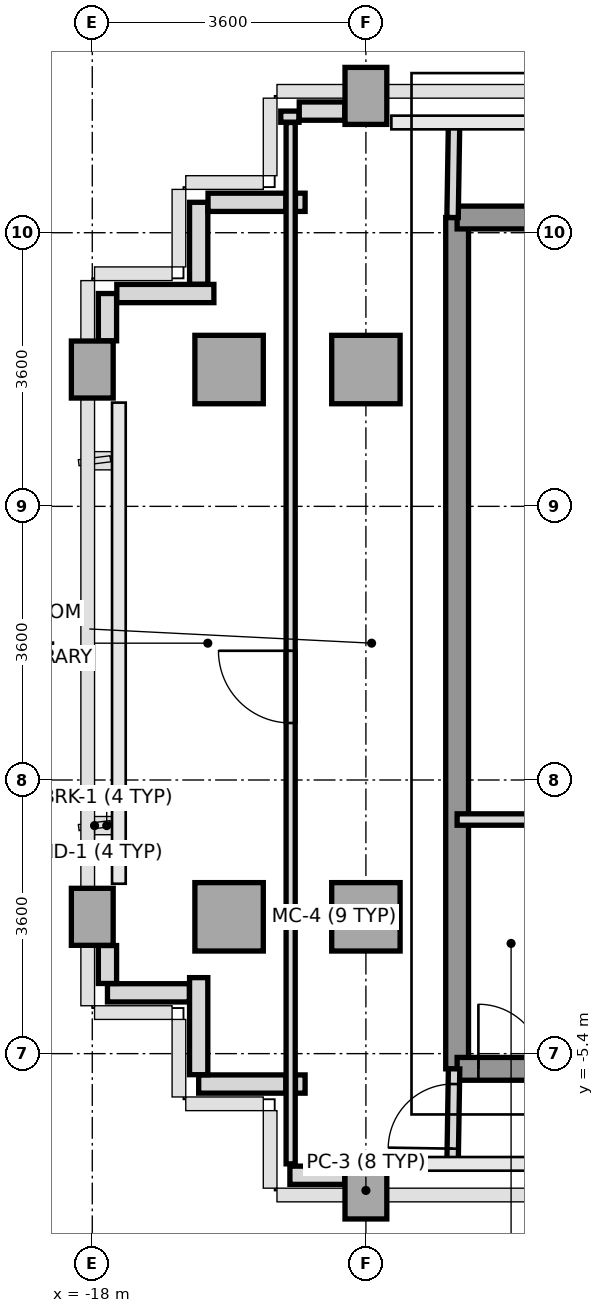
"""IFC4 building model, lengths in metres.
Left out: names, types, materials, properties, quantities, classifications, styles, units other than length and angle.
Written with IfcOpenShell. Run it as: python <this file> out.ifc"""

import sys

from ifc_helpers import new_model, si_unit, direction, frame, frame_2d, origin, origin_2d, place, context, subcontext, project, spatial, rectangle, extrude, source, transform, mapped, element, fill, save


model = new_model("IFC4")
c1 = context("Model", 3, precision=1e-05, world=origin(), true_north=direction((0.0, 1.0)))
c2 = subcontext(c1, "Body", "Model", "MODEL_VIEW")
j1 = project(units=[si_unit("LENGTHUNIT", "METRE"), si_unit("PLANEANGLEUNIT", "RADIAN")], contexts=[c1])
p1 = place(None, origin())
s1 = spatial("IfcSite", under=j1, at=p1, CompositionType="ELEMENT")
p2 = place(p1, origin())
s2 = spatial("IfcBuilding", under=s1, at=p2, CompositionType="ELEMENT")
p3 = place(p2, frame((0.0, 0.0, 226.8)))
s3 = spatial("IfcBuildingStorey", under=s2, at=p3, CompositionType="ELEMENT", Elevation=226.8)
m1 = source(origin(), c2, "Body", "SweptSolid", [
    extrude(rectangle(XDim=0.55, YDim=0.75, at=origin_2d()), origin(), (0.0, 0.0, 1.0), 3.01),
])
for number, where, z_axis, x_axis in (
    (1, (-18.0, -3.6, 0.0), (0.0, 0.0, 1.0), (1.0, 0.0, 0.0)),
    (2, (-18.0, 3.6, 0.0), (0.0, 0.0, 1.0), (1.0, 0.0, 0.0)),
):
    element("IfcColumn", number, at=place(p3, frame(where, z_axis=z_axis, x_axis=x_axis)), inside=s3, PredefinedType="COLUMN", context=c2, shape_type="MappedRepresentation", body=[
        mapped(m1, transform((0.0, 0.0, 0.0), x_axis=(1.0, 0.0, 0.0), y_axis=(0.0, 1.0, 0.0), z_axis=(0.0, 0.0, 1.0), scale=1.0)),
    ])
m2 = source(origin(), c2, "Body", "SweptSolid", [
    extrude(rectangle(XDim=0.9, YDim=0.9, at=origin_2d()), origin(), (0.0, 0.0, 1.0), 3.01),
])
for number, where, z_axis, x_axis in (
    (3, (-16.2, -3.6, 0.0), (0.0, 0.0, 1.0), (1.0, 0.0, 0.0)),
    (4, (-16.2, 3.6, 0.0), (0.0, 0.0, 1.0), (1.0, 0.0, 0.0)),
):
    element("IfcColumn", number, at=place(p3, frame(where, z_axis=z_axis, x_axis=x_axis)), inside=s3, PredefinedType="COLUMN", context=c2, shape_type="MappedRepresentation", body=[
        mapped(m2, transform((0.0, 0.0, 0.0), x_axis=(1.0, 0.0, 0.0), y_axis=(0.0, 1.0, 0.0), z_axis=(0.0, 0.0, 1.0), scale=1.0)),
    ])
p4 = place(p3, frame((-14.4, -7.2, 0.0), z_axis=(0.0, 0.0, 1.0), x_axis=(1.0, 0.0, 0.0)))
e5 = element("IfcColumn", 5, at=p4, inside=s3, PredefinedType="COLUMN", context=c2, shape_type="MappedRepresentation", body=[
    mapped(m1, transform((0.0, 0.0, 0.0), x_axis=(1.0, 0.0, 0.0), y_axis=(0.0, 1.0, 0.0), z_axis=(0.0, 0.0, 1.0), scale=1.0)),
])
for number, where, z_axis, x_axis in (
    (6, (-14.4, -3.6, 0.0), (0.0, 0.0, 1.0), (1.0, 0.0, 0.0)),
    (7, (-14.4, 3.6, 0.0), (0.0, 0.0, 1.0), (1.0, 0.0, 0.0)),
):
    element("IfcColumn", number, at=place(p3, frame(where, z_axis=z_axis, x_axis=x_axis)), inside=s3, PredefinedType="COLUMN", context=c2, shape_type="MappedRepresentation", body=[
        mapped(m2, transform((0.0, 0.0, 0.0), x_axis=(1.0, 0.0, 0.0), y_axis=(0.0, 1.0, 0.0), z_axis=(0.0, 0.0, 1.0), scale=1.0)),
    ])
p5 = place(p3, frame((-14.4, 7.2, 0.0), z_axis=(0.0, 0.0, 1.0), x_axis=(1.0, 0.0, 0.0)))
e8 = element("IfcColumn", 8, at=p5, inside=s3, PredefinedType="COLUMN", context=c2, shape_type="MappedRepresentation", body=[
    mapped(m1, transform((0.0, 0.0, 0.0), x_axis=(1.0, 0.0, 0.0), y_axis=(0.0, 1.0, 0.0), z_axis=(0.0, 0.0, 1.0), scale=1.0)),
])
p6 = place(p3, frame((-14.678, -7.0, 0.0), z_axis=(0.0, 0.0, 1.0), x_axis=(-1.0, 0.0, 0.0)))
e9 = element("IfcWall", 9, at=p6, inside=s3, PredefinedType="PARAPET", context=c2, shape_type="SweptSolid", body=[
    extrude(rectangle(XDim=0.722, YDim=0.24, at=frame_2d((0.361, 0.0))), origin(), (0.0, 0.0, 1.0), 1.15),
])
p7 = place(p3, frame((-15.2, -5.8, 0.0), z_axis=(0.0, 0.0, 1.0), x_axis=(-1.0, 0.0, 0.0)))
e10 = element("IfcWall", 10, at=p7, inside=s3, PredefinedType="PARAPET", context=c2, shape_type="SweptSolid", body=[
    extrude(rectangle(XDim=0.127, YDim=0.24, at=frame_2d((0.063, 0.0))), origin(), (0.0, 0.0, 1.0), 1.15),
])
p8 = place(p3, frame((-15.453, -5.8, 0.0), z_axis=(0.0, 0.0, 1.0), x_axis=(-1.0, 0.0, 0.0)))
e11 = element("IfcWall", 11, at=p8, inside=s3, PredefinedType="PARAPET", context=c2, shape_type="SweptSolid", body=[
    extrude(rectangle(XDim=1.147, YDim=0.24, at=frame_2d((0.574, 0.0))), origin(), (0.0, 0.0, 1.0), 1.15),
])
p9 = place(p3, frame((-16.6, -5.677, 0.0), z_axis=(0.0, 0.0, 1.0), x_axis=(0.0, 1.0, 0.0)))
e12 = element("IfcWall", 12, at=p9, inside=s3, PredefinedType="PARAPET", context=c2, shape_type="SweptSolid", body=[
    extrude(rectangle(XDim=1.277, YDim=0.24, at=frame_2d((0.639, 0.0))), origin(), (0.0, 0.0, 1.0), 1.15),
])
p10 = place(p3, frame((-16.723, -4.6, 0.0), z_axis=(0.0, 0.0, 1.0), x_axis=(-1.0, 0.0, 0.0)))
e13 = element("IfcWall", 13, at=p10, inside=s3, PredefinedType="PARAPET", context=c2, shape_type="SweptSolid", body=[
    extrude(rectangle(XDim=1.077, YDim=0.24, at=frame_2d((0.539, 0.0))), origin(), (0.0, 0.0, 1.0), 1.15),
])
p11 = place(p3, frame((-17.8, -4.477, 0.0), z_axis=(0.0, 0.0, 1.0), x_axis=(0.0, 1.0, 0.0)))
e14 = element("IfcWall", 14, at=p11, inside=s3, PredefinedType="PARAPET", context=c2, shape_type="SweptSolid", body=[
    extrude(rectangle(XDim=0.499, YDim=0.24, at=frame_2d((0.25, 0.0))), origin(), (0.0, 0.0, 1.0), 1.15),
])
p12 = place(p3, frame((-17.8, 3.978, 0.0), z_axis=(0.0, 0.0, 1.0), x_axis=(0.0, 1.0, 0.0)))
e15 = element("IfcWall", 15, at=p12, inside=s3, PredefinedType="PARAPET", context=c2, shape_type="SweptSolid", body=[
    extrude(rectangle(XDim=0.622, YDim=0.24, at=frame_2d((0.311, 0.0))), origin(), (0.0, 0.0, 1.0), 1.15),
])
p13 = place(p3, frame((-17.677, 4.6, 0.0), z_axis=(0.0, 0.0, 1.0), x_axis=(1.0, 0.0, 0.0)))
e16 = element("IfcWall", 16, at=p13, inside=s3, PredefinedType="PARAPET", context=c2, shape_type="SweptSolid", body=[
    extrude(rectangle(XDim=1.277, YDim=0.24, at=frame_2d((0.639, 0.0))), origin(), (0.0, 0.0, 1.0), 1.15),
])
p14 = place(p3, frame((-16.6, 4.723, 0.0), z_axis=(0.0, 0.0, 1.0), x_axis=(0.0, 1.0, 0.0)))
e17 = element("IfcWall", 17, at=p14, inside=s3, PredefinedType="PARAPET", context=c2, shape_type="SweptSolid", body=[
    extrude(rectangle(XDim=1.077, YDim=0.24, at=frame_2d((0.539, 0.0))), origin(), (0.0, 0.0, 1.0), 1.15),
])
p15 = place(p3, frame((-16.477, 5.8, 0.0), z_axis=(0.0, 0.0, 1.0), x_axis=(1.0, 0.0, 0.0)))
e18 = element("IfcWall", 18, at=p15, inside=s3, PredefinedType="PARAPET", context=c2, shape_type="SweptSolid", body=[
    extrude(rectangle(XDim=1.024, YDim=0.24, at=frame_2d((0.512, 0.0))), origin(), (0.0, 0.0, 1.0), 1.15),
])
p16 = place(p3, frame((-15.327, 5.8, 0.0), z_axis=(0.0, 0.0, 1.0), x_axis=(1.0, 0.0, 0.0)))
e19 = element("IfcWall", 19, at=p16, inside=s3, PredefinedType="PARAPET", context=c2, shape_type="SweptSolid", body=[
    extrude(rectangle(XDim=0.127, YDim=0.24, at=frame_2d((0.063, 0.0))), origin(), (0.0, 0.0, 1.0), 1.15),
])
p17 = place(p3, frame((-15.4, 6.853, 0.0), z_axis=(0.0, 0.0, 1.0), x_axis=(0.0, 1.0, 0.0)))
e20 = element("IfcWall", 20, at=p17, inside=s3, PredefinedType="PARAPET", context=c2, shape_type="SweptSolid", body=[
    extrude(rectangle(XDim=0.147, YDim=0.24, at=frame_2d((0.073, 0.0))), origin(), (0.0, 0.0, 1.0), 1.15),
])
p18 = place(p3, frame((-15.277, 7.0, 0.0), z_axis=(0.0, 0.0, 1.0), x_axis=(1.0, 0.0, 0.0)))
e21 = element("IfcWall", 21, at=p18, inside=s3, PredefinedType="PARAPET", context=c2, shape_type="SweptSolid", body=[
    extrude(rectangle(XDim=0.599, YDim=0.24, at=frame_2d((0.3, 0.0))), origin(), (0.0, 0.0, 1.0), 1.15),
])
p19 = place(p3, frame((-13.2, -5.6, 0.0), z_axis=(0.0, 0.0, 1.0), x_axis=(0.0, 1.0, 0.0)))
e22 = element("IfcWall", 22, at=p19, inside=s3, PredefinedType="SHEAR", context=c2, shape_type="SweptSolid", body=[
    extrude(rectangle(XDim=11.2, YDim=0.3, at=frame_2d((5.6, 0.0))), origin(), (0.0, 0.0, 1.0), 3.01),
])
p20 = place(p3, frame((-13.2, 5.6, 0.0), z_axis=(0.0, 0.0, 1.0), x_axis=(1.0, 0.0, 0.0)))
e23 = element("IfcWall", 23, at=p20, inside=s3, PredefinedType="SHEAR", context=c2, shape_type="SweptSolid", body=[
    extrude(rectangle(XDim=1.844, YDim=0.3, at=frame_2d((0.922, 0.0))), origin(), (0.0, 0.0, 1.0), 3.01),
])
p21 = place(p3, frame((-13.2, -5.6, 0.0), z_axis=(0.0, 0.0, 1.0), x_axis=(1.0, 0.0, 0.0)))
e24 = element("IfcWall", 24, at=p21, inside=s3, PredefinedType="SHEAR", context=c2, shape_type="SweptSolid", body=[
    extrude(rectangle(XDim=7.8, YDim=0.3, at=frame_2d((3.9, 0.0))), origin(), (0.0, 0.0, 1.0), 3.01),
])
p22 = place(p21, frame((0.28, 0.0, 0.0)))
e25 = element("IfcOpeningElement", 25, at=p22, cuts=e24, PredefinedType="OPENING", context=c2, shape_type="SweptSolid", body=[
    extrude(rectangle(XDim=0.85, YDim=2.1, at=frame_2d((0.425, 1.05))), frame((0.0, 0.16, 0.0), z_axis=(0.0, -1.0, 0.0), x_axis=(1.0, 0.0, 0.0)), (0.0, 0.0, 1.0), 0.32),
])
p23 = place(p21, frame((1.36, 0.0, 0.0)))
e26 = element("IfcOpeningElement", 26, at=p23, cuts=e24, PredefinedType="OPENING", context=c2, shape_type="SweptSolid", body=[
    extrude(rectangle(XDim=0.85, YDim=2.1, at=frame_2d((0.425, 1.05))), frame((0.0, 0.16, 0.0), z_axis=(0.0, -1.0, 0.0), x_axis=(1.0, 0.0, 0.0)), (0.0, 0.0, 1.0), 0.32),
])
p24 = place(p21, frame((2.85, 0.0, 0.0)))
e27 = element("IfcOpeningElement", 27, at=p24, cuts=e24, PredefinedType="OPENING", context=c2, shape_type="SweptSolid", body=[
    extrude(rectangle(XDim=0.85, YDim=2.1, at=frame_2d((0.425, 1.05))), frame((0.0, 0.16, 0.0), z_axis=(0.0, -1.0, 0.0), x_axis=(1.0, 0.0, 0.0)), (0.0, 0.0, 1.0), 0.32),
])
p25 = place(p21, frame((4.55, 0.0, 0.0)))
e28 = element("IfcOpeningElement", 28, at=p25, cuts=e24, PredefinedType="OPENING", context=c2, shape_type="SweptSolid", body=[
    extrude(rectangle(XDim=0.85, YDim=2.1, at=frame_2d((0.425, 1.05))), frame((0.0, 0.16, 0.0), z_axis=(0.0, -1.0, 0.0), x_axis=(1.0, 0.0, 0.0)), (0.0, 0.0, 1.0), 0.32),
])
p26 = place(p21, frame((6.25, 0.0, 0.0)))
e29 = element("IfcOpeningElement", 29, at=p26, cuts=e24, PredefinedType="OPENING", context=c2, shape_type="SweptSolid", body=[
    extrude(rectangle(XDim=0.85, YDim=2.1, at=frame_2d((0.425, 1.05))), frame((0.0, 0.16, 0.0), z_axis=(0.0, -1.0, 0.0), x_axis=(1.0, 0.0, 0.0)), (0.0, 0.0, 1.0), 0.32),
])
p27 = place(p3, frame((-13.2, -2.32, 0.0), z_axis=(0.0, 0.0, 1.0), x_axis=(1.0, 0.0, 0.0)))
e30 = element("IfcWall", 30, at=p27, inside=s3, PredefinedType="PARTITIONING", context=c2, shape_type="SweptSolid", body=[
    extrude(rectangle(XDim=2.18, YDim=0.15, at=frame_2d((1.09, 0.0))), origin(), (0.0, 0.0, 1.0), 3.01),
])
p28 = place(p3, frame((-13.26, 5.6, 0.0), z_axis=(0.0, 0.0, 1.0), x_axis=(0.016013571389, 0.999871774545, 0.0)))
e31 = element("IfcWall", 31, at=p28, inside=s3, PredefinedType="PARTITIONING", context=c2, shape_type="SweptSolid", body=[
    extrude(rectangle(XDim=1.25, YDim=0.15, at=frame_2d((0.625, 0.0))), origin(), (0.0, 0.0, 1.0), 3.01),
])
p29 = place(p3, frame((-13.26, -6.85, 0.0), z_axis=(0.0, 0.0, 1.0), x_axis=(0.016013571389, 0.999871774545, 0.0)))
e32 = element("IfcWall", 32, at=p29, inside=s3, PredefinedType="PARTITIONING", context=c2, shape_type="SweptSolid", body=[
    extrude(rectangle(XDim=1.25, YDim=0.15, at=frame_2d((0.625, 0.0))), origin(), (0.0, 0.0, 1.0), 3.01),
])
p30 = place(p29, frame((0.2, 0.0, 0.0)))
e33 = element("IfcOpeningElement", 33, at=p30, cuts=e32, PredefinedType="OPENING", context=c2, shape_type="SweptSolid", body=[
    extrude(rectangle(XDim=0.85, YDim=2.1, at=frame_2d((0.425, 1.05))), frame((0.0, 0.085, 0.0), z_axis=(0.0, -1.0, 0.0), x_axis=(1.0, 0.0, 0.0)), (0.0, 0.0, 1.0), 0.17),
])
p31 = place(p3, frame((-15.39, -6.85, 0.0), z_axis=(0.0, 0.0, 1.0), x_axis=(0.0, 1.0, 0.0)))
e34 = element("IfcWall", 34, at=p31, inside=s3, PredefinedType="PARTITIONING", context=c2, shape_type="SweptSolid", body=[
    extrude(rectangle(XDim=13.7, YDim=0.12, at=frame_2d((6.85, 0.0))), origin(), (0.0, 0.0, 1.0), 3.01),
])
p32 = place(p31, frame((5.8, 0.0, 0.0)))
e35 = element("IfcOpeningElement", 35, at=p32, cuts=e34, PredefinedType="OPENING", context=c2, shape_type="SweptSolid", body=[
    extrude(rectangle(XDim=0.95, YDim=2.15, at=frame_2d((0.475, 1.075))), frame((0.0, 0.07, 0.0), z_axis=(0.0, -1.0, 0.0), x_axis=(1.0, 0.0, 0.0)), (0.0, 0.0, 1.0), 0.14),
])
m3 = source(origin(), c2, "Body", "SweptSolid", [
    extrude(rectangle(XDim=0.85, YDim=2.1, at=frame_2d((0.425, 1.05))), frame((0.0, 0.025, 0.0), z_axis=(0.0, -1.0, 0.0), x_axis=(1.0, 0.0, 0.0)), (0.0, 0.0, 1.0), 0.05),
])
p33 = place(p22, origin())
e36 = element("IfcDoor", 36, at=p33, inside=s3, OperationType="SINGLE_SWING_LEFT", PredefinedType="DOOR", context=c2, shape_type="MappedRepresentation", body=[
    mapped(m3, transform((0.0, 0.0, 0.0), x_axis=(1.0, 0.0, 0.0), y_axis=(0.0, 1.0, 0.0), z_axis=(0.0, 0.0, 1.0), scale=1.0)),
])
fill(e25, e36)
p34 = place(p30, origin())
e37 = element("IfcDoor", 37, at=p34, inside=s3, OperationType="SINGLE_SWING_LEFT", PredefinedType="DOOR", context=c2, shape_type="MappedRepresentation", body=[
    mapped(m3, transform((0.0, 0.0, 0.0), x_axis=(1.0, 0.0, 0.0), y_axis=(0.0, 1.0, 0.0), z_axis=(0.0, 0.0, 1.0), scale=1.0)),
])
fill(e33, e37)
m4 = source(origin(), c2, "Body", "SweptSolid", [
    extrude(rectangle(XDim=0.95, YDim=2.15, at=frame_2d((0.475, 1.075))), frame((0.0, 0.025, 0.0), z_axis=(0.0, -1.0, 0.0), x_axis=(1.0, 0.0, 0.0)), (0.0, 0.0, 1.0), 0.05),
])
p35 = place(p32, origin())
e38 = element("IfcDoor", 38, at=p35, inside=s3, OperationType="SINGLE_SWING_RIGHT", PredefinedType="DOOR", context=c2, shape_type="MappedRepresentation", body=[
    mapped(m4, transform((0.0, 0.0, 0.0), x_axis=(1.0, 0.0, 0.0), y_axis=(0.0, 1.0, 0.0), z_axis=(0.0, 0.0, 1.0), scale=1.0)),
])
fill(e35, e38)
save(model, sys.argv[1])
